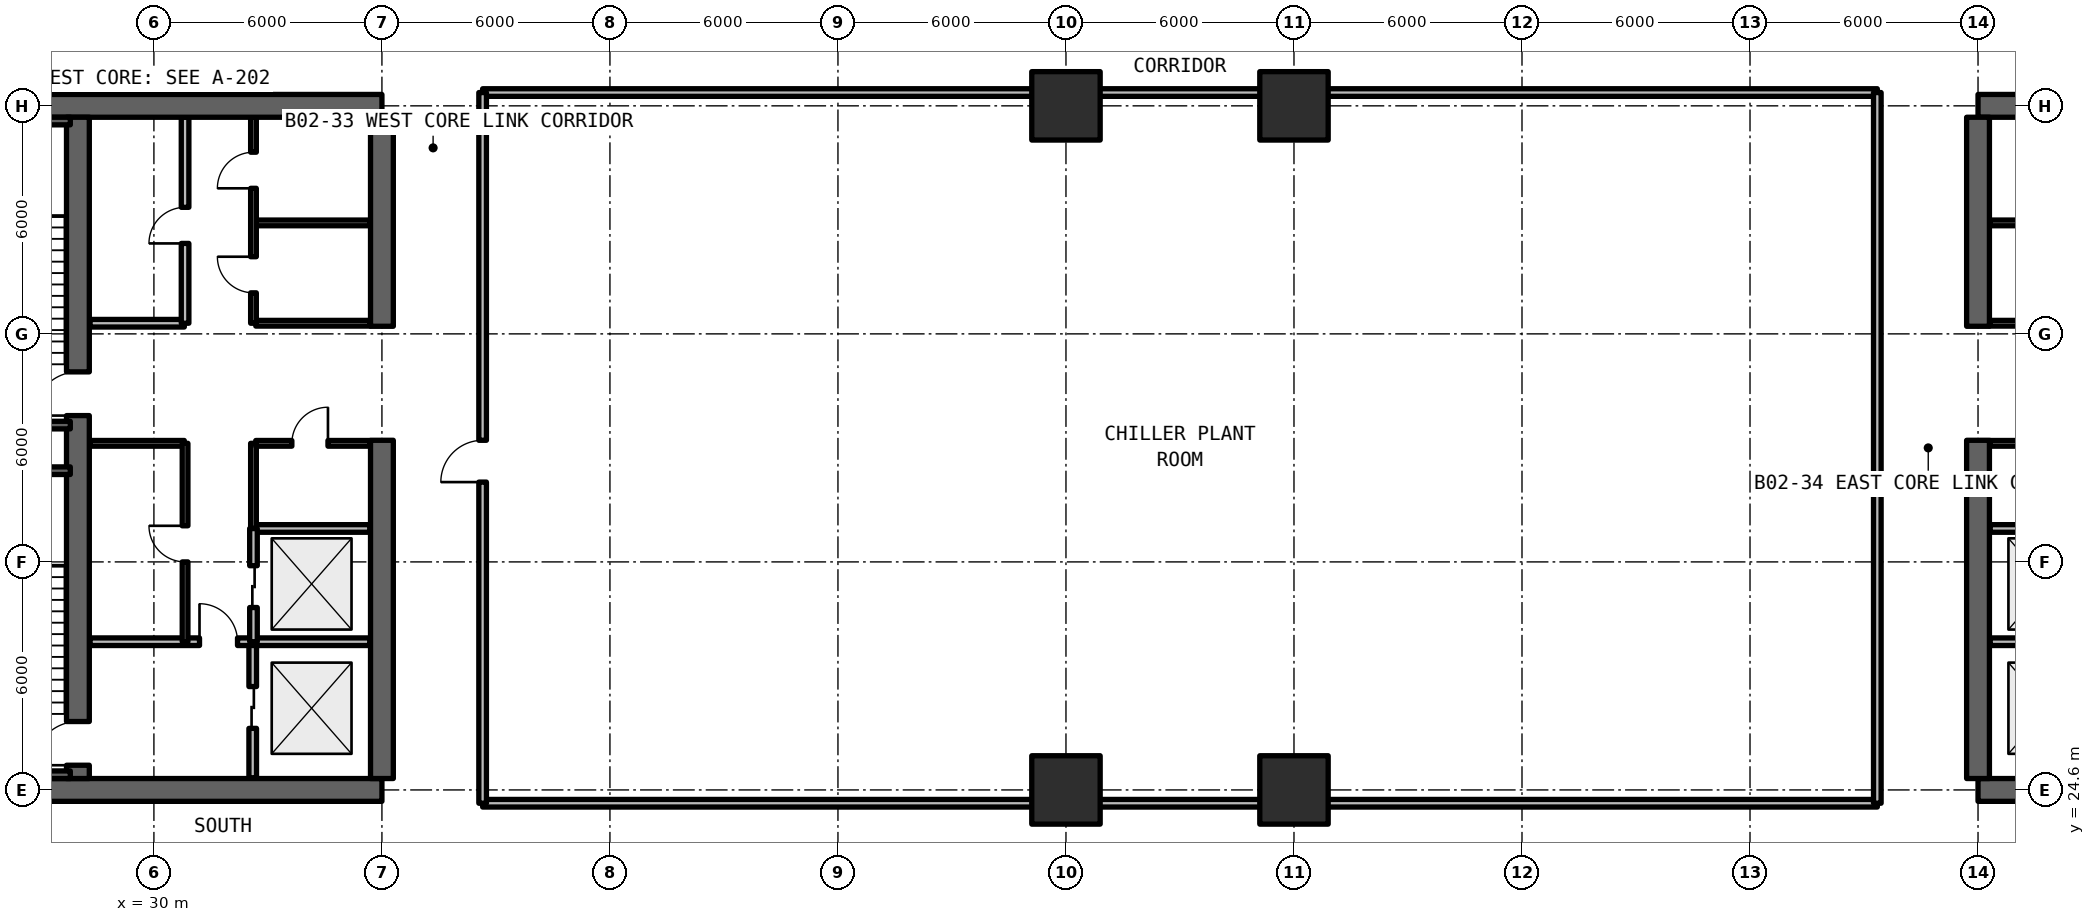
"""IFC4 building model, lengths in metres.
Left out: names, types, materials, properties, quantities, classifications, styles, units other than length and angle.
Written with IfcOpenShell. Run it as: python <this file> out.ifc"""

import sys

from ifc_helpers import new_model, si_unit, direction, frame, frame_2d, origin, origin_2d, place, context, subcontext, project, spatial, rectangle, extrude, element, fill, save


model = new_model("IFC4")
c1 = context("Model", 3, precision=1e-05, world=origin(), true_north=direction((0.0, 1.0)))
c2 = subcontext(c1, "Body", "Model", "MODEL_VIEW")
j1 = project(units=[si_unit("LENGTHUNIT", "METRE"), si_unit("PLANEANGLEUNIT", "RADIAN")], contexts=[c1])
p1 = place(None, origin())
s1 = spatial("IfcSite", under=j1, at=p1, CompositionType="ELEMENT")
p2 = place(p1, origin())
s2 = spatial("IfcBuilding", under=s1, at=p2, CompositionType="ELEMENT")
p3 = place(p2, frame((0.0, 0.0, -9.24)))
s3 = spatial("IfcBuildingStorey", under=s2, at=p3, CompositionType="ELEMENT", Elevation=-9.24)
for number, where, z_axis, x_axis in (
    (1, (24.0, 24.6, 0.0), (0.0, 0.0, 1.0), (1.0, 0.0, 0.0)),
    (2, (36.0, 42.6, 0.0), (0.0, 0.0, 1.0), (-1.0, 0.0, 0.0)),
):
    element("IfcWall", number, at=place(p3, frame(where, z_axis=z_axis, x_axis=x_axis)), inside=s3, PredefinedType="SHEAR", context=c2, shape_type="SweptSolid", body=[
        extrude(rectangle(XDim=12.0, YDim=0.6, at=frame_2d((6.0, 0.0))), origin(), (0.0, 0.0, 1.0), 4.62),
    ])
p4 = place(p3, frame((36.0, 24.9, 0.0), z_axis=(0.0, 0.0, 1.0), x_axis=(0.0, 1.0, 0.0)))
e3 = element("IfcWall", 3, at=p4, inside=s3, PredefinedType="SHEAR", context=c2, shape_type="SweptSolid", body=[
    extrude(rectangle(XDim=8.9, YDim=0.6, at=frame_2d((4.45, 0.0))), origin(), (0.0, 0.0, 1.0), 4.62),
])
p5 = place(p3, frame((36.0, 36.8, 0.0), z_axis=(0.0, 0.0, 1.0), x_axis=(0.0, 1.0, 0.0)))
e4 = element("IfcWall", 4, at=p5, inside=s3, PredefinedType="SHEAR", context=c2, shape_type="SweptSolid", body=[
    extrude(rectangle(XDim=5.5, YDim=0.6, at=frame_2d((2.75, 0.0))), origin(), (0.0, 0.0, 1.0), 4.62),
])
p6 = place(p3, frame((28.0, 24.9, 0.0), z_axis=(0.0, 0.0, 1.0), x_axis=(0.0, 1.0, 0.0)))
e5 = element("IfcWall", 5, at=p6, inside=s3, PredefinedType="SHEAR", context=c2, shape_type="SweptSolid", body=[
    extrude(rectangle(XDim=17.4, YDim=0.6, at=frame_2d((8.7, 0.0))), origin(), (0.0, 0.0, 1.0), 4.62),
])
p7 = place(p6, frame((0.35, 0.0, 0.0)))
e6 = element("IfcOpeningElement", 6, at=p7, cuts=e5, PredefinedType="OPENING", context=c2, shape_type="SweptSolid", body=[
    extrude(rectangle(XDim=1.15, YDim=2.15, at=frame_2d((0.575, 1.075))), frame((0.0, 0.31, 0.0), z_axis=(0.0, -1.0, 0.0), x_axis=(1.0, 0.0, 0.0)), (0.0, 0.0, 1.0), 0.62),
])
p8 = place(p6, frame((9.55, 0.0, 0.0)))
e7 = element("IfcOpeningElement", 7, at=p8, cuts=e5, PredefinedType="OPENING", context=c2, shape_type="SweptSolid", body=[
    extrude(rectangle(XDim=1.15, YDim=2.15, at=frame_2d((0.575, 1.075))), frame((0.0, 0.31, 0.0), z_axis=(0.0, -1.0, 0.0), x_axis=(1.0, 0.0, 0.0)), (0.0, 0.0, 1.0), 0.62),
])
for number, where, z_axis, x_axis in (
    (8, (78.0, 24.6, 0.0), (0.0, 0.0, 1.0), (1.0, 0.0, 0.0)),
    (9, (90.0, 42.6, 0.0), (0.0, 0.0, 1.0), (-1.0, 0.0, 0.0)),
):
    element("IfcWall", number, at=place(p3, frame(where, z_axis=z_axis, x_axis=x_axis)), inside=s3, PredefinedType="SHEAR", context=c2, shape_type="SweptSolid", body=[
        extrude(rectangle(XDim=12.0, YDim=0.6, at=frame_2d((6.0, 0.0))), origin(), (0.0, 0.0, 1.0), 4.62),
    ])
p9 = place(p3, frame((78.0, 24.9, 0.0), z_axis=(0.0, 0.0, 1.0), x_axis=(0.0, 1.0, 0.0)))
e10 = element("IfcWall", 10, at=p9, inside=s3, PredefinedType="SHEAR", context=c2, shape_type="SweptSolid", body=[
    extrude(rectangle(XDim=8.9, YDim=0.6, at=frame_2d((4.45, 0.0))), origin(), (0.0, 0.0, 1.0), 4.62),
])
p10 = place(p3, frame((78.0, 36.8, 0.0), z_axis=(0.0, 0.0, 1.0), x_axis=(0.0, 1.0, 0.0)))
e11 = element("IfcWall", 11, at=p10, inside=s3, PredefinedType="SHEAR", context=c2, shape_type="SweptSolid", body=[
    extrude(rectangle(XDim=5.5, YDim=0.6, at=frame_2d((2.75, 0.0))), origin(), (0.0, 0.0, 1.0), 4.62),
])
for number, where, z_axis, x_axis in (
    (12, (54.0, 24.6, 0.0), (0.0, 0.0, 1.0), (1.0, 0.0, 0.0)),
    (13, (54.0, 42.6, 0.0), (0.0, 0.0, 1.0), (1.0, 0.0, 0.0)),
    (14, (60.0, 24.6, 0.0), (0.0, 0.0, 1.0), (1.0, 0.0, 0.0)),
    (15, (60.0, 42.6, 0.0), (0.0, 0.0, 1.0), (1.0, 0.0, 0.0)),
):
    element("IfcColumn", number, at=place(p3, frame(where, z_axis=z_axis, x_axis=x_axis)), inside=s3, PredefinedType="COLUMN", context=c2, shape_type="SweptSolid", body=[
        extrude(rectangle(XDim=1.8, YDim=1.8, at=origin_2d()), origin(), (0.0, 0.0, 1.0), 4.62),
    ])
p11 = place(p3, frame((32.6, 24.92, 0.0), z_axis=(0.0, 0.0, 1.0), x_axis=(0.0, 1.0, 0.0)))
e16 = element("IfcWall", 16, at=p11, inside=s3, PredefinedType="SOLIDWALL", context=c2, shape_type="SweptSolid", body=[
    extrude(rectangle(XDim=3.58, YDim=0.2, at=frame_2d((1.79, 0.0))), origin(), (0.0, 0.0, 1.0), 3.54),
])
p12 = place(p11, frame((1.3, 0.0, 0.0)))
e17 = element("IfcOpeningElement", 17, at=p12, cuts=e16, PredefinedType="OPENING", context=c2, shape_type="SweptSolid", body=[
    extrude(rectangle(XDim=1.1, YDim=2.2, at=frame_2d((0.55, 1.1))), frame((0.0, 0.11, 0.0), z_axis=(0.0, -1.0, 0.0), x_axis=(1.0, 0.0, 0.0)), (0.0, 0.0, 1.0), 0.22),
])
p13 = place(p3, frame((28.32, 28.5, 0.0), z_axis=(0.0, 0.0, 1.0), x_axis=(1.0, 0.0, 0.0)))
e18 = element("IfcWall", 18, at=p13, inside=s3, PredefinedType="SOLIDWALL", context=c2, shape_type="SweptSolid", body=[
    extrude(rectangle(XDim=7.36, YDim=0.2, at=frame_2d((3.68, 0.0))), origin(), (0.0, 0.0, 1.0), 3.54),
])
p14 = place(p13, frame((2.88, 0.0, 0.0)))
e19 = element("IfcOpeningElement", 19, at=p14, cuts=e18, PredefinedType="OPENING", context=c2, shape_type="SweptSolid", body=[
    extrude(rectangle(XDim=1.0, YDim=2.15, at=frame_2d((0.5, 1.075))), frame((0.0, 0.11, 0.0), z_axis=(0.0, -1.0, 0.0), x_axis=(1.0, 0.0, 0.0)), (0.0, 0.0, 1.0), 0.22),
])
p15 = place(p3, frame((28.32, 33.72, 0.0), z_axis=(0.0, 0.0, 1.0), x_axis=(1.0, 0.0, 0.0)))
e20 = element("IfcWall", 20, at=p15, inside=s3, PredefinedType="SOLIDWALL", context=c2, shape_type="SweptSolid", body=[
    extrude(rectangle(XDim=2.48, YDim=0.15, at=frame_2d((1.24, 0.0))), origin(), (0.0, 0.0, 1.0), 3.54),
])
p16 = place(p3, frame((30.82, 28.5, 0.0), z_axis=(0.0, 0.0, 1.0), x_axis=(0.0, 1.0, 0.0)))
e21 = element("IfcWall", 21, at=p16, inside=s3, PredefinedType="SOLIDWALL", context=c2, shape_type="SweptSolid", body=[
    extrude(rectangle(XDim=5.22, YDim=0.15, at=frame_2d((2.61, 0.0))), origin(), (0.0, 0.0, 1.0), 3.54),
])
p17 = place(p16, frame((2.1, 0.0, 0.0)))
e22 = element("IfcOpeningElement", 22, at=p17, cuts=e21, PredefinedType="OPENING", context=c2, shape_type="SweptSolid", body=[
    extrude(rectangle(XDim=0.95, YDim=2.15, at=frame_2d((0.475, 1.075))), frame((0.0, 0.085, 0.0), z_axis=(0.0, -1.0, 0.0), x_axis=(1.0, 0.0, 0.0)), (0.0, 0.0, 1.0), 0.17),
])
p18 = place(p3, frame((32.68, 31.48, 0.0), z_axis=(0.0, 0.0, 1.0), x_axis=(1.0, 0.0, 0.0)))
e23 = element("IfcWall", 23, at=p18, inside=s3, PredefinedType="SOLIDWALL", context=c2, shape_type="SweptSolid", body=[
    extrude(rectangle(XDim=3.0, YDim=0.2, at=frame_2d((1.5, 0.0))), origin(), (0.0, 0.0, 1.0), 3.54),
])
p19 = place(p3, frame((32.62, 28.5, 0.0), z_axis=(0.0, 0.0, 1.0), x_axis=(0.0, 1.0, 0.0)))
e24 = element("IfcWall", 24, at=p19, inside=s3, PredefinedType="SOLIDWALL", context=c2, shape_type="SweptSolid", body=[
    extrude(rectangle(XDim=2.98, YDim=0.2, at=frame_2d((1.49, 0.0))), origin(), (0.0, 0.0, 1.0), 3.54),
])
p20 = place(p19, frame((0.9, 0.0, 0.0)))
e25 = element("IfcOpeningElement", 25, at=p20, cuts=e24, PredefinedType="OPENING", context=c2, shape_type="SweptSolid", body=[
    extrude(rectangle(XDim=1.1, YDim=2.2, at=frame_2d((0.55, 1.1))), frame((0.0, 0.11, 0.0), z_axis=(0.0, -1.0, 0.0), x_axis=(1.0, 0.0, 0.0)), (0.0, 0.0, 1.0), 0.22),
])
p21 = place(p3, frame((32.62, 31.48, 0.0), z_axis=(0.0, 0.0, 1.0), x_axis=(0.0, 1.0, 0.0)))
e26 = element("IfcWall", 26, at=p21, inside=s3, PredefinedType="SOLIDWALL", context=c2, shape_type="SweptSolid", body=[
    extrude(rectangle(XDim=2.24, YDim=0.15, at=frame_2d((1.12, 0.0))), origin(), (0.0, 0.0, 1.0), 3.54),
])
p22 = place(p3, frame((32.68, 33.72, 0.0), z_axis=(0.0, 0.0, 1.0), x_axis=(1.0, 0.0, 0.0)))
e27 = element("IfcWall", 27, at=p22, inside=s3, PredefinedType="SOLIDWALL", context=c2, shape_type="SweptSolid", body=[
    extrude(rectangle(XDim=3.0, YDim=0.15, at=frame_2d((1.5, 0.0))), origin(), (0.0, 0.0, 1.0), 3.54),
])
p23 = place(p22, frame((0.95, 0.0, 0.0)))
e28 = element("IfcOpeningElement", 28, at=p23, cuts=e27, PredefinedType="OPENING", context=c2, shape_type="SweptSolid", body=[
    extrude(rectangle(XDim=0.95, YDim=2.15, at=frame_2d((0.475, 1.075))), frame((0.0, 0.085, 0.0), z_axis=(0.0, -1.0, 0.0), x_axis=(1.0, 0.0, 0.0)), (0.0, 0.0, 1.0), 0.17),
])
p24 = place(p3, frame((28.32, 36.88, 0.0), z_axis=(0.0, 0.0, 1.0), x_axis=(1.0, 0.0, 0.0)))
e29 = element("IfcWall", 29, at=p24, inside=s3, PredefinedType="SOLIDWALL", context=c2, shape_type="SweptSolid", body=[
    extrude(rectangle(XDim=2.48, YDim=0.2, at=frame_2d((1.24, 0.0))), origin(), (0.0, 0.0, 1.0), 3.54),
])
p25 = place(p3, frame((30.82, 36.88, 0.0), z_axis=(0.0, 0.0, 1.0), x_axis=(0.0, 1.0, 0.0)))
e30 = element("IfcWall", 30, at=p25, inside=s3, PredefinedType="SOLIDWALL", context=c2, shape_type="SweptSolid", body=[
    extrude(rectangle(XDim=5.42, YDim=0.2, at=frame_2d((2.71, 0.0))), origin(), (0.0, 0.0, 1.0), 3.54),
])
p26 = place(p25, frame((2.1, 0.0, 0.0)))
e31 = element("IfcOpeningElement", 31, at=p26, cuts=e30, PredefinedType="OPENING", context=c2, shape_type="SweptSolid", body=[
    extrude(rectangle(XDim=0.95, YDim=2.15, at=frame_2d((0.475, 1.075))), frame((0.0, 0.11, 0.0), z_axis=(0.0, -1.0, 0.0), x_axis=(1.0, 0.0, 0.0)), (0.0, 0.0, 1.0), 0.22),
])
for number, where, z_axis, x_axis in (
    (32, (32.68, 36.88, 0.0), (0.0, 0.0, 1.0), (1.0, 0.0, 0.0)),
    (33, (32.68, 39.52, 0.0), (0.0, 0.0, 1.0), (1.0, 0.0, 0.0)),
):
    element("IfcWall", number, at=place(p3, frame(where, z_axis=z_axis, x_axis=x_axis)), inside=s3, PredefinedType="SOLIDWALL", context=c2, shape_type="SweptSolid", body=[
        extrude(rectangle(XDim=3.0, YDim=0.15, at=frame_2d((1.5, 0.0))), origin(), (0.0, 0.0, 1.0), 3.54),
    ])
p27 = place(p3, frame((32.62, 36.88, 0.0), z_axis=(0.0, 0.0, 1.0), x_axis=(0.0, 1.0, 0.0)))
e34 = element("IfcWall", 34, at=p27, inside=s3, PredefinedType="SOLIDWALL", context=c2, shape_type="SweptSolid", body=[
    extrude(rectangle(XDim=5.42, YDim=0.15, at=frame_2d((2.71, 0.0))), origin(), (0.0, 0.0, 1.0), 3.54),
])
p28 = place(p27, frame((0.8, 0.0, 0.0)))
e35 = element("IfcOpeningElement", 35, at=p28, cuts=e34, PredefinedType="OPENING", context=c2, shape_type="SweptSolid", body=[
    extrude(rectangle(XDim=0.95, YDim=2.15, at=frame_2d((0.475, 1.075))), frame((0.0, 0.085, 0.0), z_axis=(0.0, -1.0, 0.0), x_axis=(1.0, 0.0, 0.0)), (0.0, 0.0, 1.0), 0.17),
])
p29 = place(p27, frame((3.55, 0.0, 0.0)))
e36 = element("IfcOpeningElement", 36, at=p29, cuts=e34, PredefinedType="OPENING", context=c2, shape_type="SweptSolid", body=[
    extrude(rectangle(XDim=0.95, YDim=2.15, at=frame_2d((0.475, 1.075))), frame((0.0, 0.085, 0.0), z_axis=(0.0, -1.0, 0.0), x_axis=(1.0, 0.0, 0.0)), (0.0, 0.0, 1.0), 0.17),
])
p30 = place(p3, frame((78.32, 28.5, 0.0), z_axis=(0.0, 0.0, 1.0), x_axis=(1.0, 0.0, 0.0)))
e37 = element("IfcWall", 37, at=p30, inside=s3, PredefinedType="SOLIDWALL", context=c2, shape_type="SweptSolid", body=[
    extrude(rectangle(XDim=7.36, YDim=0.2, at=frame_2d((3.68, 0.0))), origin(), (0.0, 0.0, 1.0), 3.54),
])
p31 = place(p30, frame((3.48, 0.0, 0.0)))
e38 = element("IfcOpeningElement", 38, at=p31, cuts=e37, PredefinedType="OPENING", context=c2, shape_type="SweptSolid", body=[
    extrude(rectangle(XDim=1.0, YDim=2.15, at=frame_2d((0.5, 1.075))), frame((0.0, 0.11, 0.0), z_axis=(0.0, -1.0, 0.0), x_axis=(1.0, 0.0, 0.0)), (0.0, 0.0, 1.0), 0.22),
])
p32 = place(p3, frame((78.32, 31.48, 0.0), z_axis=(0.0, 0.0, 1.0), x_axis=(1.0, 0.0, 0.0)))
e39 = element("IfcWall", 39, at=p32, inside=s3, PredefinedType="SOLIDWALL", context=c2, shape_type="SweptSolid", body=[
    extrude(rectangle(XDim=3.0, YDim=0.2, at=frame_2d((1.5, 0.0))), origin(), (0.0, 0.0, 1.0), 3.54),
])
p33 = place(p3, frame((78.32, 33.72, 0.0), z_axis=(0.0, 0.0, 1.0), x_axis=(1.0, 0.0, 0.0)))
e40 = element("IfcWall", 40, at=p33, inside=s3, PredefinedType="SOLIDWALL", context=c2, shape_type="SweptSolid", body=[
    extrude(rectangle(XDim=3.0, YDim=0.15, at=frame_2d((1.5, 0.0))), origin(), (0.0, 0.0, 1.0), 3.54),
])
p34 = place(p33, frame((0.95, 0.0, 0.0)))
e41 = element("IfcOpeningElement", 41, at=p34, cuts=e40, PredefinedType="OPENING", context=c2, shape_type="SweptSolid", body=[
    extrude(rectangle(XDim=0.95, YDim=2.15, at=frame_2d((0.475, 1.075))), frame((0.0, 0.085, 0.0), z_axis=(0.0, -1.0, 0.0), x_axis=(1.0, 0.0, 0.0)), (0.0, 0.0, 1.0), 0.17),
])
for number, where, z_axis, x_axis in (
    (42, (78.32, 36.88, 0.0), (0.0, 0.0, 1.0), (1.0, 0.0, 0.0)),
    (43, (78.32, 39.52, 0.0), (0.0, 0.0, 1.0), (1.0, 0.0, 0.0)),
):
    element("IfcWall", number, at=place(p3, frame(where, z_axis=z_axis, x_axis=x_axis)), inside=s3, PredefinedType="SOLIDWALL", context=c2, shape_type="SweptSolid", body=[
        extrude(rectangle(XDim=3.0, YDim=0.15, at=frame_2d((1.5, 0.0))), origin(), (0.0, 0.0, 1.0), 3.54),
    ])
for number, where, z_axis, x_axis in (
    (44, (38.65, 24.25, 0.0), (0.0, 0.0, 1.0), (1.0, 0.0, 0.0)),
    (45, (38.65, 42.95, 0.0), (0.0, 0.0, 1.0), (1.0, 0.0, 0.0)),
):
    element("IfcWall", number, at=place(p3, frame(where, z_axis=z_axis, x_axis=x_axis)), inside=s3, PredefinedType="SOLIDWALL", context=c2, shape_type="SweptSolid", body=[
        extrude(rectangle(XDim=36.7, YDim=0.2, at=frame_2d((18.35, 0.0))), origin(), (0.0, 0.0, 1.0), 3.54),
    ])
p35 = place(p3, frame((38.65, 24.25, 0.0), z_axis=(0.0, 0.0, 1.0), x_axis=(0.0, 1.0, 0.0)))
e46 = element("IfcWall", 46, at=p35, inside=s3, PredefinedType="SOLIDWALL", context=c2, shape_type="SweptSolid", body=[
    extrude(rectangle(XDim=18.7, YDim=0.2, at=frame_2d((9.35, 0.0))), origin(), (0.0, 0.0, 1.0), 3.54),
])
p36 = place(p35, frame((8.45, 0.0, 0.0)))
e47 = element("IfcOpeningElement", 47, at=p36, cuts=e46, PredefinedType="OPENING", context=c2, shape_type="SweptSolid", body=[
    extrude(rectangle(XDim=1.1, YDim=2.15, at=frame_2d((0.55, 1.075))), frame((0.0, 0.11, 0.0), z_axis=(0.0, -1.0, 0.0), x_axis=(1.0, 0.0, 0.0)), (0.0, 0.0, 1.0), 0.22),
])
p37 = place(p3, frame((75.35, 24.25, 0.0), z_axis=(0.0, 0.0, 1.0), x_axis=(0.0, 1.0, 0.0)))
e48 = element("IfcWall", 48, at=p37, inside=s3, PredefinedType="SOLIDWALL", context=c2, shape_type="SweptSolid", body=[
    extrude(rectangle(XDim=18.7, YDim=0.2, at=frame_2d((9.35, 0.0))), origin(), (0.0, 0.0, 1.0), 3.54),
])
for number, where, z_axis, x_axis in (
    (49, (24.4, 25.0, 0.0), (0.0, 0.0, 1.0), (1.0, 0.0, 0.0)),
    (50, (27.8, 33.0, 0.0), (0.0, 0.0, 1.0), (-1.0, 0.0, 0.0)),
    (51, (24.4, 34.2, 0.0), (0.0, 0.0, 1.0), (1.0, 0.0, 0.0)),
    (52, (27.8, 42.2, 0.0), (0.0, 0.0, 1.0), (-1.0, 0.0, 0.0)),
):
    element("IfcWall", number, at=place(p3, frame(where, z_axis=z_axis, x_axis=x_axis)), inside=s3, PredefinedType="SOLIDWALL", context=c2, shape_type="SweptSolid", body=[
        extrude(rectangle(XDim=3.4, YDim=0.2, at=frame_2d((1.7, 0.0))), origin(), (0.0, 0.0, 1.0), 4.62),
    ])
p38 = place(p12, origin())
e53 = element("IfcDoor", 53, at=p38, inside=s3, OperationType="SLIDING_TO_LEFT", PredefinedType="DOOR", context=c2, shape_type="SweptSolid", body=[
    extrude(rectangle(XDim=1.1, YDim=2.2, at=frame_2d((0.55, 1.1))), frame((0.0, 0.025, 0.0), z_axis=(0.0, -1.0, 0.0), x_axis=(1.0, 0.0, 0.0)), (0.0, 0.0, 1.0), 0.05),
])
fill(e17, e53)
p39 = place(p14, origin())
e54 = element("IfcDoor", 54, at=p39, inside=s3, OperationType="SINGLE_SWING_LEFT", PredefinedType="DOOR", context=c2, shape_type="SweptSolid", body=[
    extrude(rectangle(XDim=1.0, YDim=2.15, at=frame_2d((0.5, 1.075))), frame((0.0, 0.025, 0.0), z_axis=(0.0, -1.0, 0.0), x_axis=(1.0, 0.0, 0.0)), (0.0, 0.0, 1.0), 0.05),
])
fill(e19, e54)
p40 = place(p17, origin())
e55 = element("IfcDoor", 55, at=p40, inside=s3, OperationType="SINGLE_SWING_RIGHT", PredefinedType="DOOR", context=c2, shape_type="SweptSolid", body=[
    extrude(rectangle(XDim=0.95, YDim=2.15, at=frame_2d((0.475, 1.075))), frame((0.0, 0.025, 0.0), z_axis=(0.0, -1.0, 0.0), x_axis=(1.0, 0.0, 0.0)), (0.0, 0.0, 1.0), 0.05),
])
fill(e22, e55)
p41 = place(p20, origin())
e56 = element("IfcDoor", 56, at=p41, inside=s3, OperationType="SLIDING_TO_LEFT", PredefinedType="DOOR", context=c2, shape_type="SweptSolid", body=[
    extrude(rectangle(XDim=1.1, YDim=2.2, at=frame_2d((0.55, 1.1))), frame((0.0, 0.025, 0.0), z_axis=(0.0, -1.0, 0.0), x_axis=(1.0, 0.0, 0.0)), (0.0, 0.0, 1.0), 0.05),
])
fill(e25, e56)
p42 = place(p23, origin())
e57 = element("IfcDoor", 57, at=p42, inside=s3, OperationType="SINGLE_SWING_RIGHT", PredefinedType="DOOR", context=c2, shape_type="SweptSolid", body=[
    extrude(rectangle(XDim=0.95, YDim=2.15, at=frame_2d((0.475, 1.075))), frame((0.0, 0.025, 0.0), z_axis=(0.0, -1.0, 0.0), x_axis=(1.0, 0.0, 0.0)), (0.0, 0.0, 1.0), 0.05),
])
fill(e28, e57)
p43 = place(p26, origin())
e58 = element("IfcDoor", 58, at=p43, inside=s3, OperationType="SINGLE_SWING_LEFT", PredefinedType="DOOR", context=c2, shape_type="SweptSolid", body=[
    extrude(rectangle(XDim=0.95, YDim=2.15, at=frame_2d((0.475, 1.075))), frame((0.0, 0.025, 0.0), z_axis=(0.0, -1.0, 0.0), x_axis=(1.0, 0.0, 0.0)), (0.0, 0.0, 1.0), 0.05),
])
fill(e31, e58)
p44 = place(p28, origin())
e59 = element("IfcDoor", 59, at=p44, inside=s3, OperationType="SINGLE_SWING_RIGHT", PredefinedType="DOOR", context=c2, shape_type="SweptSolid", body=[
    extrude(rectangle(XDim=0.95, YDim=2.15, at=frame_2d((0.475, 1.075))), frame((0.0, 0.025, 0.0), z_axis=(0.0, -1.0, 0.0), x_axis=(1.0, 0.0, 0.0)), (0.0, 0.0, 1.0), 0.05),
])
fill(e35, e59)
p45 = place(p29, origin())
e60 = element("IfcDoor", 60, at=p45, inside=s3, OperationType="SINGLE_SWING_LEFT", PredefinedType="DOOR", context=c2, shape_type="SweptSolid", body=[
    extrude(rectangle(XDim=0.95, YDim=2.15, at=frame_2d((0.475, 1.075))), frame((0.0, 0.025, 0.0), z_axis=(0.0, -1.0, 0.0), x_axis=(1.0, 0.0, 0.0)), (0.0, 0.0, 1.0), 0.05),
])
fill(e36, e60)
p46 = place(p36, origin())
e61 = element("IfcDoor", 61, at=p46, inside=s3, OperationType="SINGLE_SWING_LEFT", PredefinedType="DOOR", context=c2, shape_type="SweptSolid", body=[
    extrude(rectangle(XDim=1.1, YDim=2.15, at=frame_2d((0.55, 1.075))), frame((0.0, 0.025, 0.0), z_axis=(0.0, -1.0, 0.0), x_axis=(1.0, 0.0, 0.0)), (0.0, 0.0, 1.0), 0.05),
])
fill(e47, e61)
p47 = place(p7, origin())
e62 = element("IfcDoor", 62, at=p47, inside=s3, OperationType="SINGLE_SWING_LEFT", PredefinedType="DOOR", context=c2, shape_type="SweptSolid", body=[
    extrude(rectangle(XDim=1.15, YDim=2.15, at=frame_2d((0.575, 1.075))), frame((0.0, 0.025, 0.0), z_axis=(0.0, -1.0, 0.0), x_axis=(1.0, 0.0, 0.0)), (0.0, 0.0, 1.0), 0.05),
])
fill(e6, e62)
p48 = place(p8, origin())
e63 = element("IfcDoor", 63, at=p48, inside=s3, OperationType="SINGLE_SWING_RIGHT", PredefinedType="DOOR", context=c2, shape_type="SweptSolid", body=[
    extrude(rectangle(XDim=1.15, YDim=2.15, at=frame_2d((0.575, 1.075))), frame((0.0, 0.025, 0.0), z_axis=(0.0, -1.0, 0.0), x_axis=(1.0, 0.0, 0.0)), (0.0, 0.0, 1.0), 0.05),
])
fill(e7, e63)
save(model, sys.argv[1])
